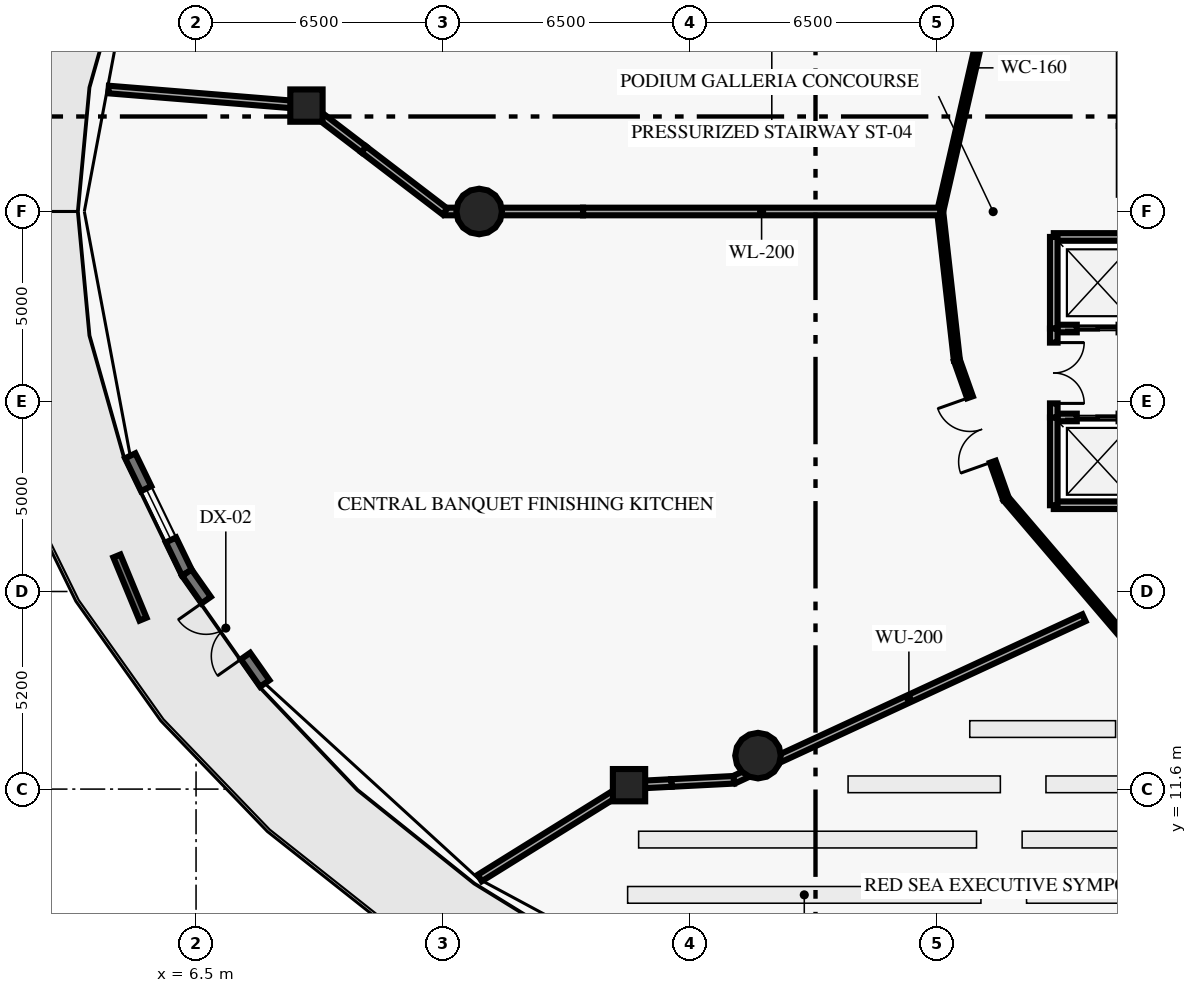
"""IFC4 building model, lengths in metres.
Left out: names, types, materials, properties, quantities, classifications, styles, units other than length and angle.
Written with IfcOpenShell. Run it as: python <this file> out.ifc"""

import sys

from ifc_helpers import new_model, si_unit, direction, frame, frame_2d, origin, origin_2d, place, context, subcontext, project, spatial, rectangle, circle, extrude, element, fill, save


model = new_model("IFC4")
c1 = context("Model", 3, precision=1e-05, world=origin(), true_north=direction((0.0, 1.0)))
c2 = subcontext(c1, "Body", "Model", "MODEL_VIEW")
j1 = project(units=[si_unit("LENGTHUNIT", "METRE"), si_unit("PLANEANGLEUNIT", "RADIAN")], contexts=[c1])
p1 = place(None, origin())
s1 = spatial("IfcSite", under=j1, at=p1, CompositionType="ELEMENT")
p2 = place(p1, origin())
s2 = spatial("IfcBuilding", under=s1, at=p2, CompositionType="ELEMENT")
p3 = place(p2, frame((0.0, 0.0, 11.0)))
s3 = spatial("IfcBuildingStorey", under=s2, at=p3, CompositionType="ELEMENT", Elevation=11.0)
for number, where, z_axis, x_axis in (
    (1, (13.95, 26.8, 0.0), (0.0, 0.0, 1.0), (1.0, 0.0, 0.0)),
    (2, (21.287, 12.481, 0.0), (0.0, 0.0, 1.0), (1.0, 0.0, 0.0)),
):
    element("IfcColumn", number, at=place(p3, frame(where, z_axis=z_axis, x_axis=x_axis)), inside=s3, PredefinedType="COLUMN", context=c2, shape_type="SweptSolid", body=[
        extrude(circle(Radius=0.6, at=origin_2d()), origin(), (0.0, 0.0, 1.0), 4.7),
    ])
for number, where, z_axis, x_axis in (
    (3, (9.405, 29.587, 0.0), (0.0, 0.0, 1.0), (1.0, 0.0, 0.0)),
    (4, (17.893, 11.703, 0.0), (0.0, 0.0, 1.0), (1.0, 0.0, 0.0)),
):
    element("IfcColumn", number, at=place(p3, frame(where, z_axis=z_axis, x_axis=x_axis)), inside=s3, PredefinedType="COLUMN", context=c2, shape_type="SweptSolid", body=[
        extrude(rectangle(XDim=0.85, YDim=0.85, at=origin_2d()), origin(), (0.0, 0.0, 1.0), 4.7),
    ])
p4 = place(p3, frame((6.258, 17.294, 0.0), z_axis=(0.0, 0.0, 1.0), x_axis=(-0.43580915718, 0.900039098328, 0.0)))
e5 = element("IfcWall", 5, at=p4, inside=s3, PredefinedType="STANDARD", context=c2, shape_type="SweptSolid", body=[
    extrude(rectangle(XDim=3.419, YDim=0.3, at=frame_2d((1.709, 0.0))), origin(), (0.0, 0.0, 1.0), 4.7),
])
p5 = place(p4, frame((0.959, 0.0, 0.9)))
e6 = element("IfcOpeningElement", 6, at=p5, cuts=e5, PredefinedType="OPENING", context=c2, shape_type="SweptSolid", body=[
    extrude(rectangle(XDim=1.5, YDim=2.2, at=frame_2d((0.75, 1.1))), frame((0.0, 0.16, 0.0), z_axis=(0.0, -1.0, 0.0), x_axis=(1.0, 0.0, 0.0)), (0.0, 0.0, 1.0), 0.32),
])
p6 = place(p3, frame((8.308, 14.38, 0.0), z_axis=(0.0, 0.0, 1.0), x_axis=(-0.575383073495, 0.817884049689, 0.0)))
e7 = element("IfcWall", 7, at=p6, inside=s3, PredefinedType="STANDARD", context=c2, shape_type="SweptSolid", body=[
    extrude(rectangle(XDim=3.563, YDim=0.3, at=frame_2d((1.781, 0.0))), origin(), (0.0, 0.0, 1.0), 4.7),
])
p7 = place(p6, frame((0.881, 0.0, 0.0)))
e8 = element("IfcOpeningElement", 8, at=p7, cuts=e7, PredefinedType="OPENING", context=c2, shape_type="SweptSolid", body=[
    extrude(rectangle(XDim=1.8, YDim=2.25, at=frame_2d((0.9, 1.125))), frame((0.0, 0.16, 0.0), z_axis=(0.0, -1.0, 0.0), x_axis=(1.0, 0.0, 0.0)), (0.0, 0.0, 1.0), 0.32),
])
p8 = place(p3, frame((5.105, 16.072, 0.0), z_axis=(0.0, 0.0, 1.0), x_axis=(-0.382263927846, 0.924053185411, 0.0)))
e9 = element("IfcWall", 9, at=p8, inside=s3, PredefinedType="ELEMENTEDWALL", context=c2, shape_type="SweptSolid", body=[
    extrude(rectangle(XDim=1.8, YDim=0.2, at=frame_2d((0.9, 0.0))), origin(), (0.0, 0.0, 1.0), 0.65),
])
p9 = place(p3, frame((29.07, 23.72, 0.0), z_axis=(0.0, 0.0, 1.0), x_axis=(1.0, 0.0, 0.0)))
e10 = element("IfcWall", 10, at=p9, inside=s3, PredefinedType="SOLIDWALL", context=c2, shape_type="SweptSolid", body=[
    extrude(rectangle(XDim=2.31, YDim=0.2, at=frame_2d((1.155, 0.0))), origin(), (0.0, 0.0, 1.0), 4.7),
])
p10 = place(p9, frame((0.605, 0.0, 0.0)))
e11 = element("IfcOpeningElement", 11, at=p10, cuts=e10, PredefinedType="OPENING", context=c2, shape_type="SweptSolid", body=[
    extrude(rectangle(XDim=1.1, YDim=2.15, at=frame_2d((0.55, 1.075))), frame((0.0, 0.11, 0.0), z_axis=(0.0, -1.0, 0.0), x_axis=(1.0, 0.0, 0.0)), (0.0, 0.0, 1.0), 0.22),
])
p11 = place(p3, frame((29.07, 26.13, 0.0), z_axis=(0.0, 0.0, 1.0), x_axis=(1.0, 0.0, 0.0)))
e12 = element("IfcWall", 12, at=p11, inside=s3, PredefinedType="SOLIDWALL", context=c2, shape_type="SweptSolid", body=[
    extrude(rectangle(XDim=2.31, YDim=0.2, at=frame_2d((1.155, 0.0))), origin(), (0.0, 0.0, 1.0), 4.7),
])
p12 = place(p3, frame((29.07, 23.72, 0.0), z_axis=(0.0, 0.0, 1.0), x_axis=(0.0, 1.0, 0.0)))
e13 = element("IfcWall", 13, at=p12, inside=s3, PredefinedType="SOLIDWALL", context=c2, shape_type="SweptSolid", body=[
    extrude(rectangle(XDim=2.41, YDim=0.2, at=frame_2d((1.205, 0.0))), origin(), (0.0, 0.0, 1.0), 4.7),
])
p13 = place(p3, frame((29.07, 19.07, 0.0), z_axis=(0.0, 0.0, 1.0), x_axis=(1.0, 0.0, 0.0)))
e14 = element("IfcWall", 14, at=p13, inside=s3, PredefinedType="SOLIDWALL", context=c2, shape_type="SweptSolid", body=[
    extrude(rectangle(XDim=2.31, YDim=0.2, at=frame_2d((1.155, 0.0))), origin(), (0.0, 0.0, 1.0), 4.7),
])
p14 = place(p3, frame((29.07, 21.38, 0.0), z_axis=(0.0, 0.0, 1.0), x_axis=(1.0, 0.0, 0.0)))
e15 = element("IfcWall", 15, at=p14, inside=s3, PredefinedType="SOLIDWALL", context=c2, shape_type="SweptSolid", body=[
    extrude(rectangle(XDim=2.31, YDim=0.2, at=frame_2d((1.155, 0.0))), origin(), (0.0, 0.0, 1.0), 4.7),
])
p15 = place(p14, frame((0.605, 0.0, 0.0)))
e16 = element("IfcOpeningElement", 16, at=p15, cuts=e15, PredefinedType="OPENING", context=c2, shape_type="SweptSolid", body=[
    extrude(rectangle(XDim=1.1, YDim=2.15, at=frame_2d((0.55, 1.075))), frame((0.0, 0.11, 0.0), z_axis=(0.0, -1.0, 0.0), x_axis=(1.0, 0.0, 0.0)), (0.0, 0.0, 1.0), 0.22),
])
p16 = place(p3, frame((29.07, 19.07, 0.0), z_axis=(0.0, 0.0, 1.0), x_axis=(0.0, 1.0, 0.0)))
e17 = element("IfcWall", 17, at=p16, inside=s3, PredefinedType="SOLIDWALL", context=c2, shape_type="SweptSolid", body=[
    extrude(rectangle(XDim=2.31, YDim=0.2, at=frame_2d((1.155, 0.0))), origin(), (0.0, 0.0, 1.0), 4.7),
])
p17 = place(p3, frame((29.07, 21.38, 0.0), z_axis=(0.0, 0.0, 1.0), x_axis=(0.0, 1.0, 0.0)))
e18 = element("IfcWall", 18, at=p17, inside=s3, PredefinedType="SOLIDWALL", context=c2, shape_type="SweptSolid", body=[
    extrude(rectangle(XDim=2.34, YDim=0.2, at=frame_2d((1.17, 0.0))), origin(), (0.0, 0.0, 1.0), 4.7),
])
p18 = place(p17, frame((0.37, 0.0, 0.0)))
e19 = element("IfcOpeningElement", 19, at=p18, cuts=e18, PredefinedType="OPENING", context=c2, shape_type="SweptSolid", body=[
    extrude(rectangle(XDim=1.6, YDim=2.2, at=frame_2d((0.8, 1.1))), frame((0.0, 0.11, 0.0), z_axis=(0.0, -1.0, 0.0), x_axis=(1.0, 0.0, 0.0)), (0.0, 0.0, 1.0), 0.22),
])
p19 = place(p3, frame((27.811, 34.36, 0.0), z_axis=(0.0, 0.0, 1.0), x_axis=(-0.223185487206, -0.974775993909, 0.0)))
e20 = element("IfcWall", 20, at=p19, inside=s3, PredefinedType="PARTITIONING", context=c2, shape_type="SweptSolid", body=[
    extrude(rectangle(XDim=7.756, YDim=0.16, at=frame_2d((3.878, 0.0))), origin(), (0.0, 0.0, 1.0), 4.7),
])
p20 = place(p3, frame((26.08, 26.8, 0.0), z_axis=(0.0, 0.0, 1.0), x_axis=(0.111724363671, -0.99373923469, 0.0)))
e21 = element("IfcWall", 21, at=p20, inside=s3, PredefinedType="PARTITIONING", context=c2, shape_type="SweptSolid", body=[
    extrude(rectangle(XDim=3.938, YDim=0.16, at=frame_2d((1.969, 0.0))), origin(), (0.0, 0.0, 1.0), 4.7),
])
p21 = place(p3, frame((27.811, 19.24, 0.0), z_axis=(0.0, 0.0, 1.0), x_axis=(-0.333704620558, 0.942677689467, 0.0)))
e22 = element("IfcWall", 22, at=p21, inside=s3, PredefinedType="PARTITIONING", context=c2, shape_type="SweptSolid", body=[
    extrude(rectangle(XDim=3.869, YDim=0.16, at=frame_2d((1.934, 0.0))), origin(), (0.0, 0.0, 1.0), 4.7),
])
p22 = place(p21, frame((1.034, 0.0, 0.0)))
e23 = element("IfcOpeningElement", 23, at=p22, cuts=e22, PredefinedType="OPENING", context=c2, shape_type="SweptSolid", body=[
    extrude(rectangle(XDim=1.8, YDim=2.3, at=frame_2d((0.9, 1.15))), frame((0.0, 0.09, 0.0), z_axis=(0.0, -1.0, 0.0), x_axis=(1.0, 0.0, 0.0)), (0.0, 0.0, 1.0), 0.18),
])
p23 = place(p3, frame((27.811, 19.24, 0.0), z_axis=(0.0, 0.0, 1.0), x_axis=(0.649652680018, -0.760231145998, 0.0)))
e24 = element("IfcWall", 24, at=p23, inside=s3, PredefinedType="PARTITIONING", context=c2, shape_type="SweptSolid", body=[
    extrude(rectangle(XDim=7.279, YDim=0.16, at=frame_2d((3.64, 0.0))), origin(), (0.0, 0.0, 1.0), 4.7),
])
p24 = place(p3, frame((26.08, 26.8, 0.0), z_axis=(0.0, 0.0, 1.0), x_axis=(-1.0, 0.0, 0.0)))
e25 = element("IfcWall", 25, at=p24, inside=s3, PredefinedType="SOLIDWALL", context=c2, shape_type="SweptSolid", body=[
    extrude(rectangle(XDim=9.397, YDim=0.2, at=frame_2d((4.698, 0.0))), origin(), (0.0, 0.0, 1.0), 4.7),
])
p25 = place(p3, frame((16.683, 26.8, 0.0), z_axis=(0.0, 0.0, 1.0), x_axis=(-1.0, 0.0, 0.0)))
e26 = element("IfcWall", 26, at=p25, inside=s3, PredefinedType="SOLIDWALL", context=c2, shape_type="SweptSolid", body=[
    extrude(rectangle(XDim=2.744, YDim=0.2, at=frame_2d((1.372, 0.0))), origin(), (0.0, 0.0, 1.0), 3.66),
])
p26 = place(p3, frame((13.939, 26.8, 0.0), z_axis=(0.0, 0.0, 1.0), x_axis=(-1.0, 0.0, 0.0)))
e27 = element("IfcWall", 27, at=p26, inside=s3, PredefinedType="SOLIDWALL", context=c2, shape_type="SweptSolid", body=[
    extrude(rectangle(XDim=0.889, YDim=0.2, at=frame_2d((0.444, 0.0))), origin(), (0.0, 0.0, 1.0), 4.7),
])
p27 = place(p3, frame((13.05, 26.8, 0.0), z_axis=(0.0, 0.0, 1.0), x_axis=(-0.794337234882, 0.607477042595, 0.0)))
e28 = element("IfcWall", 28, at=p27, inside=s3, PredefinedType="SOLIDWALL", context=c2, shape_type="SweptSolid", body=[
    extrude(rectangle(XDim=2.691, YDim=0.2, at=frame_2d((1.346, 0.0))), origin(), (0.0, 0.0, 1.0), 4.7),
])
p28 = place(p3, frame((10.912, 28.435, 0.0), z_axis=(0.0, 0.0, 1.0), x_axis=(-0.794514897702, 0.607244660191, 0.0)))
e29 = element("IfcWall", 29, at=p28, inside=s3, PredefinedType="SOLIDWALL", context=c2, shape_type="SweptSolid", body=[
    extrude(rectangle(XDim=1.897, YDim=0.2, at=frame_2d((0.948, 0.0))), origin(), (0.0, 0.0, 1.0), 4.24),
])
p29 = place(p3, frame((9.405, 29.587, 0.0), z_axis=(0.0, 0.0, 1.0), x_axis=(-0.996715094871, 0.080987774729, 0.0)))
e30 = element("IfcWall", 30, at=p29, inside=s3, PredefinedType="SOLIDWALL", context=c2, shape_type="SweptSolid", body=[
    extrude(rectangle(XDim=5.224, YDim=0.2, at=frame_2d((2.612, 0.0))), origin(), (0.0, 0.0, 1.0), 4.7),
])
p30 = place(p3, frame((29.864, 16.109, 0.0), z_axis=(0.0, 0.0, 1.0), x_axis=(-0.907520382507, -0.420008041988, 0.0)))
e31 = element("IfcWall", 31, at=p30, inside=s3, PredefinedType="PARTITIONING", context=c2, shape_type="SweptSolid", body=[
    extrude(rectangle(XDim=10.152, YDim=0.2, at=frame_2d((5.076, 0.0))), origin(), (0.0, 0.0, 1.0), 4.7),
])
p31 = place(p3, frame((20.651, 11.845, 0.0), z_axis=(0.0, 0.0, 1.0), x_axis=(-0.998692725363, -0.051115949639, 0.0)))
e32 = element("IfcWall", 32, at=p31, inside=s3, PredefinedType="PARTITIONING", context=c2, shape_type="SweptSolid", body=[
    extrude(rectangle(XDim=1.643, YDim=0.2, at=frame_2d((0.822, 0.0))), origin(), (0.0, 0.0, 1.0), 4.7),
])
p32 = place(p3, frame((19.01, 11.761, 0.0), z_axis=(0.0, 0.0, 1.0), x_axis=(-0.998649603439, -0.051951607785, 0.0)))
e33 = element("IfcWall", 33, at=p32, inside=s3, PredefinedType="PARTITIONING", context=c2, shape_type="SweptSolid", body=[
    extrude(rectangle(XDim=1.118, YDim=0.2, at=frame_2d((0.559, 0.0))), origin(), (0.0, 0.0, 1.0), 4.24),
])
p33 = place(p3, frame((17.893, 11.703, 0.0), z_axis=(0.0, 0.0, 1.0), x_axis=(-0.849173378653, -0.528114166623, 0.0)))
e34 = element("IfcWall", 34, at=p33, inside=s3, PredefinedType="PARTITIONING", context=c2, shape_type="SweptSolid", body=[
    extrude(rectangle(XDim=4.626, YDim=0.2, at=frame_2d((2.313, 0.0))), origin(), (0.0, 0.0, 1.0), 4.7),
])
p34 = place(p5, origin())
e35 = element("IfcWindow", 35, at=p34, inside=s3, PartitioningType="DOUBLE_PANEL_VERTICAL", PredefinedType="WINDOW", context=c2, shape_type="SweptSolid", body=[
    extrude(rectangle(XDim=1.5, YDim=2.2, at=frame_2d((0.75, 1.1))), frame((0.0, 0.03, 0.0), z_axis=(0.0, -1.0, 0.0), x_axis=(1.0, 0.0, 0.0)), (0.0, 0.0, 1.0), 0.06),
])
fill(e6, e35)
p35 = place(p7, origin())
e36 = element("IfcDoor", 36, at=p35, inside=s3, OperationType="DOUBLE_DOOR_SINGLE_SWING", PredefinedType="DOOR", context=c2, shape_type="SweptSolid", body=[
    extrude(rectangle(XDim=1.8, YDim=2.25, at=frame_2d((0.9, 1.125))), frame((0.0, 0.025, 0.0), z_axis=(0.0, -1.0, 0.0), x_axis=(1.0, 0.0, 0.0)), (0.0, 0.0, 1.0), 0.05),
])
fill(e8, e36)
p36 = place(p10, origin())
e37 = element("IfcDoor", 37, at=p36, inside=s3, OperationType="DOUBLE_DOOR_SLIDING", PredefinedType="DOOR", context=c2, shape_type="SweptSolid", body=[
    extrude(rectangle(XDim=1.1, YDim=2.15, at=frame_2d((0.55, 1.075))), frame((0.0, 0.025, 0.0), z_axis=(0.0, -1.0, 0.0), x_axis=(1.0, 0.0, 0.0)), (0.0, 0.0, 1.0), 0.05),
])
fill(e11, e37)
p37 = place(p15, origin())
e38 = element("IfcDoor", 38, at=p37, inside=s3, OperationType="DOUBLE_DOOR_SLIDING", PredefinedType="DOOR", context=c2, shape_type="SweptSolid", body=[
    extrude(rectangle(XDim=1.1, YDim=2.15, at=frame_2d((0.55, 1.075))), frame((0.0, 0.025, 0.0), z_axis=(0.0, -1.0, 0.0), x_axis=(1.0, 0.0, 0.0)), (0.0, 0.0, 1.0), 0.05),
])
fill(e16, e38)
p38 = place(p18, origin())
e39 = element("IfcDoor", 39, at=p38, inside=s3, OperationType="DOUBLE_DOOR_SINGLE_SWING", PredefinedType="DOOR", context=c2, shape_type="SweptSolid", body=[
    extrude(rectangle(XDim=1.6, YDim=2.2, at=frame_2d((0.8, 1.1))), frame((0.0, 0.025, 0.0), z_axis=(0.0, -1.0, 0.0), x_axis=(1.0, 0.0, 0.0)), (0.0, 0.0, 1.0), 0.05),
])
fill(e19, e39)
p39 = place(p22, origin())
e40 = element("IfcDoor", 40, at=p39, inside=s3, OperationType="DOUBLE_DOOR_SINGLE_SWING", PredefinedType="DOOR", context=c2, shape_type="SweptSolid", body=[
    extrude(rectangle(XDim=1.8, YDim=2.3, at=frame_2d((0.9, 1.15))), frame((0.0, 0.025, 0.0), z_axis=(0.0, -1.0, 0.0), x_axis=(1.0, 0.0, 0.0)), (0.0, 0.0, 1.0), 0.05),
])
fill(e23, e40)
save(model, sys.argv[1])
